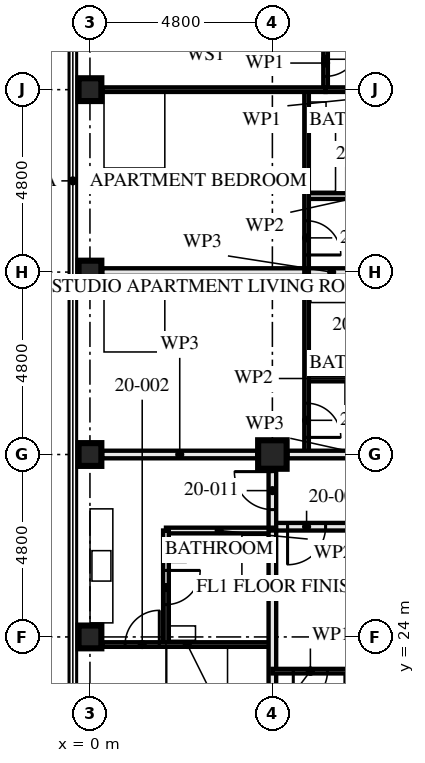
"""IFC4 building model, lengths in metres.
Left out: names, types, materials, properties, quantities, classifications, styles, units other than length and angle.
Written with IfcOpenShell. Run it as: python <this file> out.ifc"""

import sys

from ifc_helpers import new_model, si_unit, direction, frame, frame_2d, origin, origin_2d, place, context, subcontext, project, spatial, rectangle, hollow_rectangle, extrude, element, fill, save


model = new_model("IFC4")
c1 = context("Model", 3, precision=1e-05, world=origin(), true_north=direction((0.0, 1.0)))
c2 = subcontext(c1, "Body", "Model", "MODEL_VIEW")
j1 = project(units=[si_unit("LENGTHUNIT", "METRE"), si_unit("PLANEANGLEUNIT", "RADIAN")], contexts=[c1])
p1 = place(None, origin())
s1 = spatial("IfcSite", under=j1, at=p1, CompositionType="ELEMENT")
p2 = place(p1, origin())
s2 = spatial("IfcBuilding", under=s1, at=p2, CompositionType="ELEMENT")
p3 = place(p2, frame((0.0, 0.0, 76.0)))
s3 = spatial("IfcBuildingStorey", under=s2, at=p3, CompositionType="ELEMENT", Elevation=76.0)
for number, where, z_axis, x_axis in (
    (1, (0.0, 24.0, 0.0), (0.0, 0.0, 1.0), (1.0, 0.0, 0.0)),
    (2, (0.0, 28.8, 0.0), (0.0, 0.0, 1.0), (0.0, 1.0, 0.0)),
    (3, (0.0, 33.6, 0.0), (0.0, 0.0, 1.0), (1.0, 0.0, 0.0)),
    (4, (0.0, 38.4, 0.0), (0.0, 0.0, 1.0), (1.0, 0.0, 0.0)),
):
    element("IfcColumn", number, at=place(p3, frame(where, z_axis=z_axis, x_axis=x_axis)), inside=s3, PredefinedType="COLUMN", context=c2, shape_type="SweptSolid", body=[
        extrude(hollow_rectangle(XDim=0.6, YDim=0.6, WallThickness=0.08, at=origin_2d()), origin(), (0.0, 0.0, 1.0), 3.5),
    ])
p4 = place(p3, frame((4.8, 28.8, 0.0), z_axis=(0.0, 0.0, 1.0), x_axis=(0.0, 1.0, 0.0)))
e5 = element("IfcColumn", 5, at=p4, inside=s3, PredefinedType="COLUMN", context=c2, shape_type="SweptSolid", body=[
    extrude(hollow_rectangle(XDim=0.75, YDim=0.75, WallThickness=0.08, at=origin_2d()), origin(), (0.0, 0.0, 1.0), 3.5),
])
p5 = place(p3, frame((2.0, 23.8, 0.0), z_axis=(0.0, 0.0, 1.0), x_axis=(0.0, 1.0, 0.0)))
e6 = element("IfcWall", 6, at=p5, inside=s3, PredefinedType="PARTITIONING", context=c2, shape_type="SweptSolid", body=[
    extrude(rectangle(XDim=3.0, YDim=0.15, at=frame_2d((1.5, 0.0))), origin(), (0.0, 0.0, 1.0), 2.04),
])
p6 = place(p5, frame((1.05, 0.0, 0.0)))
e7 = element("IfcOpeningElement", 7, at=p6, cuts=e6, PredefinedType="OPENING", context=c2, shape_type="SweptSolid", body=[
    extrude(rectangle(XDim=0.9, YDim=2.0, at=frame_2d((0.45, 1.0))), frame((0.0, 0.085, 0.0), z_axis=(0.0, -1.0, 0.0), x_axis=(1.0, 0.0, 0.0)), (0.0, 0.0, 1.0), 0.171),
])
p7 = place(p3, frame((2.0, 26.8, 0.0), z_axis=(0.0, 0.0, 1.0), x_axis=(1.0, 0.0, 0.0)))
e8 = element("IfcWall", 8, at=p7, inside=s3, PredefinedType="PARTITIONING", context=c2, shape_type="SweptSolid", body=[
    extrude(rectangle(XDim=2.8, YDim=0.15, at=frame_2d((1.4, 0.0))), origin(), (0.0, 0.0, 1.0), 3.25),
])
p8 = place(p3, frame((0.32, 23.8, 0.0), z_axis=(0.0, 0.0, 1.0), x_axis=(1.0, 0.0, 0.0)))
e9 = element("IfcWall", 9, at=p8, inside=s3, PredefinedType="PARTITIONING", context=c2, shape_type="SweptSolid", body=[
    extrude(rectangle(XDim=4.48, YDim=0.12, at=frame_2d((2.24, 0.0))), origin(), (0.0, 0.0, 1.0), 2.04),
])
p9 = place(p8, frame((0.605, 0.0, 0.0)))
e10 = element("IfcOpeningElement", 10, at=p9, cuts=e9, PredefinedType="OPENING", context=c2, shape_type="SweptSolid", body=[
    extrude(rectangle(XDim=0.9, YDim=2.0, at=frame_2d((0.45, 1.0))), frame((0.0, 0.071, 0.0), z_axis=(0.0, -1.0, 0.0), x_axis=(1.0, 0.0, 0.0)), (0.0, 0.0, 1.0), 0.141),
])
p10 = place(p3, frame((4.8, 19.52, 0.0), z_axis=(0.0, 0.0, 1.0), x_axis=(0.0, 1.0, 0.0)))
e11 = element("IfcWall", 11, at=p10, inside=s3, PredefinedType="PARTITIONING", context=c2, shape_type="SweptSolid", body=[
    extrude(rectangle(XDim=7.28, YDim=0.2, at=frame_2d((3.64, 0.0))), origin(), (0.0, 0.0, 1.0), 2.04),
])
p11 = place(p3, frame((4.8, 23.1, 0.0), z_axis=(0.0, 0.0, 1.0), x_axis=(1.0, 0.0, 0.0)))
e12 = element("IfcWall", 12, at=p11, inside=s3, PredefinedType="PARTITIONING", context=c2, shape_type="SweptSolid", body=[
    extrude(rectangle(XDim=2.0, YDim=0.12, at=frame_2d((1.0, 0.0))), origin(), (0.0, 0.0, 1.0), 3.25),
])
p12 = place(p11, frame((0.55, 0.0, 0.0)))
e13 = element("IfcOpeningElement", 13, at=p12, cuts=e12, PredefinedType="OPENING", context=c2, shape_type="SweptSolid", body=[
    extrude(rectangle(XDim=0.9, YDim=2.1, at=frame_2d((0.45, 1.05))), frame((0.0, 0.071, 0.0), z_axis=(0.0, -1.0, 0.0), x_axis=(1.0, 0.0, 0.0)), (0.0, 0.0, 1.0), 0.141),
])
p13 = place(p3, frame((4.8, 26.9, 0.0), z_axis=(0.0, 0.0, 1.0), x_axis=(1.0, 0.0, 0.0)))
e14 = element("IfcWall", 14, at=p13, inside=s3, PredefinedType="PARTITIONING", context=c2, shape_type="SweptSolid", body=[
    extrude(rectangle(XDim=9.6, YDim=0.2, at=frame_2d((4.8, 0.0))), origin(), (0.0, 0.0, 1.0), 3.25),
])
p14 = place(p13, frame((0.4, 0.0, 0.0)))
e15 = element("IfcOpeningElement", 15, at=p14, cuts=e14, PredefinedType="OPENING", context=c2, shape_type="SweptSolid", body=[
    extrude(rectangle(XDim=1.0, YDim=2.1, at=frame_2d((0.5, 1.05))), frame((0.0, 0.111, 0.0), z_axis=(0.0, -1.0, 0.0), x_axis=(1.0, 0.0, 0.0)), (0.0, 0.0, 1.0), 0.221),
])
p15 = place(p13, frame((5.2, 0.0, 0.0)))
e16 = element("IfcOpeningElement", 16, at=p15, cuts=e14, PredefinedType="OPENING", context=c2, shape_type="SweptSolid", body=[
    extrude(rectangle(XDim=1.0, YDim=2.1, at=frame_2d((0.5, 1.05))), frame((0.0, 0.111, 0.0), z_axis=(0.0, -1.0, 0.0), x_axis=(1.0, 0.0, 0.0)), (0.0, 0.0, 1.0), 0.221),
])
p16 = place(p3, frame((4.8, 26.8, 0.0), z_axis=(0.0, 0.0, 1.0), x_axis=(0.0, 1.0, 0.0)))
e17 = element("IfcWall", 17, at=p16, inside=s3, PredefinedType="PARTITIONING", context=c2, shape_type="SweptSolid", body=[
    extrude(rectangle(XDim=1.605, YDim=0.2, at=frame_2d((0.802, 0.0))), origin(), (0.0, 0.0, 1.0), 3.25),
])
p17 = place(p16, frame((0.55, 0.0, 0.0)))
e18 = element("IfcOpeningElement", 18, at=p17, cuts=e17, PredefinedType="OPENING", context=c2, shape_type="SweptSolid", body=[
    extrude(rectangle(XDim=1.0, YDim=2.1, at=frame_2d((0.5, 1.05))), frame((0.0, 0.111, 0.0), z_axis=(0.0, -1.0, 0.0), x_axis=(1.0, 0.0, 0.0)), (0.0, 0.0, 1.0), 0.221),
])
p18 = place(p3, frame((5.7, 35.6, 0.0), z_axis=(0.0, 0.0, 1.0), x_axis=(1.0, 0.0, 0.0)))
e19 = element("IfcWall", 19, at=p18, inside=s3, PredefinedType="PARTITIONING", context=c2, shape_type="SweptSolid", body=[
    extrude(rectangle(XDim=3.0, YDim=0.15, at=frame_2d((1.5, 0.0))), origin(), (0.0, 0.0, 1.0), 3.25),
])
p19 = place(p18, frame((1.05, 0.0, 0.0)))
e20 = element("IfcOpeningElement", 20, at=p19, cuts=e19, PredefinedType="OPENING", context=c2, shape_type="SweptSolid", body=[
    extrude(rectangle(XDim=0.9, YDim=2.1, at=frame_2d((0.45, 1.05))), frame((0.0, 0.085, 0.0), z_axis=(0.0, -1.0, 0.0), x_axis=(1.0, 0.0, 0.0)), (0.0, 0.0, 1.0), 0.171),
])
p20 = place(p3, frame((6.2, 38.4, 0.0), z_axis=(0.0, 0.0, 1.0), x_axis=(1.0, 0.0, 0.0)))
e21 = element("IfcWall", 21, at=p20, inside=s3, PredefinedType="PARTITIONING", context=c2, shape_type="SweptSolid", body=[
    extrude(rectangle(XDim=6.25, YDim=0.12, at=frame_2d((3.125, 0.0))), origin(), (0.0, 0.0, 1.0), 2.04),
])
p21 = place(p20, frame((3.9, 0.0, 0.0)))
e22 = element("IfcOpeningElement", 22, at=p21, cuts=e21, PredefinedType="OPENING", context=c2, shape_type="SweptSolid", body=[
    extrude(rectangle(XDim=0.9, YDim=2.0, at=frame_2d((0.45, 1.0))), frame((0.0, 0.071, 0.0), z_axis=(0.0, -1.0, 0.0), x_axis=(1.0, 0.0, 0.0)), (0.0, 0.0, 1.0), 0.141),
])
p22 = place(p3, frame((6.2, 39.8, 0.0), z_axis=(0.0, 0.0, 1.0), x_axis=(0.0, -1.0, 0.0)))
e23 = element("IfcWall", 23, at=p22, inside=s3, PredefinedType="PARTITIONING", context=c2, shape_type="SweptSolid", body=[
    extrude(rectangle(XDim=1.4, YDim=0.12, at=frame_2d((0.7, 0.0))), origin(), (0.0, 0.0, 1.0), 3.25),
])
p23 = place(p22, frame((0.15, 0.0, 0.0)))
e24 = element("IfcOpeningElement", 24, at=p23, cuts=e23, PredefinedType="OPENING", context=c2, shape_type="SweptSolid", body=[
    extrude(rectangle(XDim=0.9, YDim=2.1, at=frame_2d((0.45, 1.05))), frame((0.0, 0.071, 0.0), z_axis=(0.0, -1.0, 0.0), x_axis=(1.0, 0.0, 0.0)), (0.0, 0.0, 1.0), 0.141),
])
p24 = place(p3, frame((5.7, 38.4, 0.0), z_axis=(0.0, 0.0, 1.0), x_axis=(0.0, -1.0, 0.0)))
e25 = element("IfcWall", 25, at=p24, inside=s3, PredefinedType="PARTITIONING", context=c2, shape_type="SweptSolid", body=[
    extrude(rectangle(XDim=4.8, YDim=0.12, at=frame_2d((2.4, 0.0))), origin(), (0.0, 0.0, 1.0), 3.25),
])
p25 = place(p24, frame((3.45, 0.0, 0.0)))
e26 = element("IfcOpeningElement", 26, at=p25, cuts=e25, PredefinedType="OPENING", context=c2, shape_type="SweptSolid", body=[
    extrude(rectangle(XDim=0.9, YDim=2.1, at=frame_2d((0.45, 1.05))), frame((0.0, 0.071, 0.0), z_axis=(0.0, -1.0, 0.0), x_axis=(1.0, 0.0, 0.0)), (0.0, 0.0, 1.0), 0.141),
])
p26 = place(p3, frame((0.32, 38.4, 0.0), z_axis=(0.0, 0.0, 1.0), x_axis=(1.0, 0.0, 0.0)))
e27 = element("IfcWall", 27, at=p26, inside=s3, PredefinedType="PARTITIONING", context=c2, shape_type="SweptSolid", body=[
    extrude(rectangle(XDim=5.88, YDim=0.12, at=frame_2d((2.94, 0.0))), origin(), (0.0, 0.0, 1.0), 2.04),
])
p27 = place(p3, frame((0.32, 33.6, 0.0), z_axis=(0.0, 0.0, 1.0), x_axis=(1.0, 0.0, 0.0)))
e28 = element("IfcWall", 28, at=p27, inside=s3, PredefinedType="PARTITIONING", context=c2, shape_type="SweptSolid", body=[
    extrude(rectangle(XDim=12.08, YDim=0.2, at=frame_2d((6.04, 0.0))), origin(), (0.0, 0.0, 1.0), 2.04),
])
p28 = place(p3, frame((5.7, 30.8, 0.0), z_axis=(0.0, 0.0, 1.0), x_axis=(1.0, 0.0, 0.0)))
e29 = element("IfcWall", 29, at=p28, inside=s3, PredefinedType="PARTITIONING", context=c2, shape_type="SweptSolid", body=[
    extrude(rectangle(XDim=3.0, YDim=0.15, at=frame_2d((1.5, 0.0))), origin(), (0.0, 0.0, 1.0), 3.25),
])
p29 = place(p3, frame((5.7, 33.6, 0.0), z_axis=(0.0, 0.0, 1.0), x_axis=(0.0, -1.0, 0.0)))
e30 = element("IfcWall", 30, at=p29, inside=s3, PredefinedType="PARTITIONING", context=c2, shape_type="SweptSolid", body=[
    extrude(rectangle(XDim=4.8, YDim=0.12, at=frame_2d((2.4, 0.0))), origin(), (0.0, 0.0, 1.0), 3.25),
])
p30 = place(p29, frame((3.45, 0.0, 0.0)))
e31 = element("IfcOpeningElement", 31, at=p30, cuts=e30, PredefinedType="OPENING", context=c2, shape_type="SweptSolid", body=[
    extrude(rectangle(XDim=0.9, YDim=2.1, at=frame_2d((0.45, 1.05))), frame((0.0, 0.071, 0.0), z_axis=(0.0, -1.0, 0.0), x_axis=(1.0, 0.0, 0.0)), (0.0, 0.0, 1.0), 0.141),
])
p31 = place(p3, frame((9.205, 28.8, 0.0), z_axis=(0.0, 0.0, 1.0), x_axis=(-1.0, 0.0, 0.0)))
e32 = element("IfcWall", 32, at=p31, inside=s3, PredefinedType="PARTITIONING", context=c2, shape_type="SweptSolid", body=[
    extrude(rectangle(XDim=4.01, YDim=0.2, at=frame_2d((2.005, 0.0))), origin(), (0.0, 0.0, 1.0), 2.04),
])
p32 = place(p3, frame((4.405, 28.8, 0.0), z_axis=(0.0, 0.0, 1.0), x_axis=(-1.0, 0.0, 0.0)))
e33 = element("IfcWall", 33, at=p32, inside=s3, PredefinedType="PARTITIONING", context=c2, shape_type="SweptSolid", body=[
    extrude(rectangle(XDim=4.085, YDim=0.2, at=frame_2d((2.042, 0.0))), origin(), (0.0, 0.0, 1.0), 2.04),
])
p33 = place(p6, frame((0.9, 0.0, 0.0), z_axis=(0.0, 0.0, 1.0), x_axis=(-1.0, 0.0, 0.0)))
e34 = element("IfcDoor", 34, at=p33, inside=s3, OperationType="SINGLE_SWING_RIGHT", PredefinedType="DOOR", context=c2, shape_type="SweptSolid", body=[
    extrude(rectangle(XDim=0.9, YDim=2.0, at=frame_2d((0.45, 1.0))), frame((0.0, 0.022, 0.0), z_axis=(0.0, -1.0, 0.0), x_axis=(1.0, 0.0, 0.0)), (0.0, 0.0, 1.0), 0.044),
])
fill(e7, e34)
p34 = place(p9, origin())
e35 = element("IfcDoor", 35, at=p34, inside=s3, OperationType="SINGLE_SWING_LEFT", PredefinedType="DOOR", context=c2, shape_type="SweptSolid", body=[
    extrude(rectangle(XDim=0.9, YDim=2.0, at=frame_2d((0.45, 1.0))), frame((0.0, 0.022, 0.0), z_axis=(0.0, -1.0, 0.0), x_axis=(1.0, 0.0, 0.0)), (0.0, 0.0, 1.0), 0.044),
])
fill(e10, e35)
p35 = place(p12, frame((0.9, 0.0, 0.0), z_axis=(0.0, 0.0, 1.0), x_axis=(-1.0, 0.0, 0.0)))
e36 = element("IfcDoor", 36, at=p35, inside=s3, OperationType="SINGLE_SWING_LEFT", PredefinedType="DOOR", context=c2, shape_type="SweptSolid", body=[
    extrude(rectangle(XDim=0.9, YDim=2.1, at=frame_2d((0.45, 1.05))), frame((0.0, 0.022, 0.0), z_axis=(0.0, -1.0, 0.0), x_axis=(1.0, 0.0, 0.0)), (0.0, 0.0, 1.0), 0.044),
])
fill(e13, e36)
p36 = place(p14, frame((1.0, 0.0, 0.0), z_axis=(0.0, 0.0, 1.0), x_axis=(-1.0, 0.0, 0.0)))
e37 = element("IfcDoor", 37, at=p36, inside=s3, OperationType="SINGLE_SWING_LEFT", PredefinedType="DOOR", context=c2, shape_type="SweptSolid", body=[
    extrude(rectangle(XDim=1.0, YDim=2.1, at=frame_2d((0.5, 1.05))), frame((0.0, 0.027, 0.0), z_axis=(0.0, -1.0, 0.0), x_axis=(1.0, 0.0, 0.0)), (0.0, 0.0, 1.0), 0.054),
])
fill(e15, e37)
p37 = place(p17, origin())
e38 = element("IfcDoor", 38, at=p37, inside=s3, OperationType="SINGLE_SWING_LEFT", PredefinedType="DOOR", context=c2, shape_type="SweptSolid", body=[
    extrude(rectangle(XDim=1.0, YDim=2.1, at=frame_2d((0.5, 1.05))), frame((0.0, 0.027, 0.0), z_axis=(0.0, -1.0, 0.0), x_axis=(1.0, 0.0, 0.0)), (0.0, 0.0, 1.0), 0.054),
])
fill(e18, e38)
p38 = place(p23, origin())
e39 = element("IfcDoor", 39, at=p38, inside=s3, OperationType="SINGLE_SWING_RIGHT", PredefinedType="DOOR", context=c2, shape_type="SweptSolid", body=[
    extrude(rectangle(XDim=0.9, YDim=2.1, at=frame_2d((0.45, 1.05))), frame((0.0, 0.022, 0.0), z_axis=(0.0, -1.0, 0.0), x_axis=(1.0, 0.0, 0.0)), (0.0, 0.0, 1.0), 0.044),
])
fill(e24, e39)
p39 = place(p25, origin())
e40 = element("IfcDoor", 40, at=p39, inside=s3, OperationType="SINGLE_SWING_LEFT", PredefinedType="DOOR", context=c2, shape_type="SweptSolid", body=[
    extrude(rectangle(XDim=0.9, YDim=2.1, at=frame_2d((0.45, 1.05))), frame((0.0, 0.022, 0.0), z_axis=(0.0, -1.0, 0.0), x_axis=(1.0, 0.0, 0.0)), (0.0, 0.0, 1.0), 0.044),
])
fill(e26, e40)
p40 = place(p30, origin())
e41 = element("IfcDoor", 41, at=p40, inside=s3, OperationType="SINGLE_SWING_LEFT", PredefinedType="DOOR", context=c2, shape_type="SweptSolid", body=[
    extrude(rectangle(XDim=0.9, YDim=2.1, at=frame_2d((0.45, 1.05))), frame((0.0, 0.022, 0.0), z_axis=(0.0, -1.0, 0.0), x_axis=(1.0, 0.0, 0.0)), (0.0, 0.0, 1.0), 0.044),
])
fill(e31, e41)
save(model, sys.argv[1])
